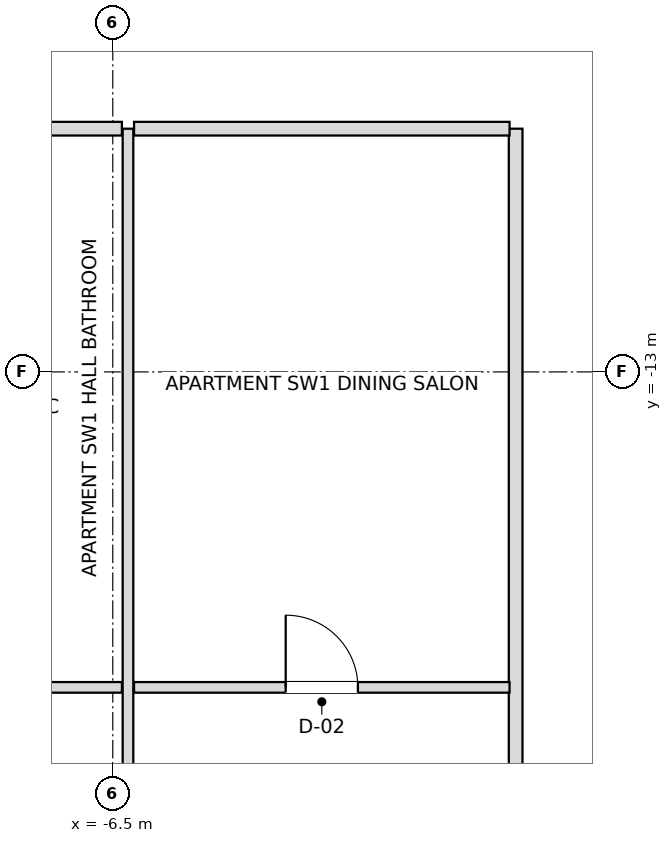
"""IFC4 building model, lengths in metres.
Left out: names, types, materials, properties, quantities, classifications, styles, units other than length and angle.
Written with IfcOpenShell. Run it as: python <this file> out.ifc"""

import sys

from ifc_helpers import new_model, si_unit, direction, frame, frame_2d, origin, place, context, subcontext, project, spatial, rectangle, extrude, element, fill, save


model = new_model("IFC4")
c1 = context("Model", 3, precision=1e-05, world=origin(), true_north=direction((0.0, 1.0)))
c2 = subcontext(c1, "Body", "Model", "MODEL_VIEW")
j1 = project(units=[si_unit("LENGTHUNIT", "METRE"), si_unit("PLANEANGLEUNIT", "RADIAN")], contexts=[c1])
p1 = place(None, origin())
s1 = spatial("IfcSite", under=j1, at=p1, CompositionType="ELEMENT")
p2 = place(p1, origin())
s2 = spatial("IfcBuilding", under=s1, at=p2, CompositionType="ELEMENT")
p3 = place(p2, frame((0.0, 0.0, 140.4)))
s3 = spatial("IfcBuildingStorey", under=s2, at=p3, CompositionType="ELEMENT", Elevation=140.4)
p4 = place(p3, frame((-6.3, -23.15, 0.0), z_axis=(0.0, 0.0, 1.0), x_axis=(0.0, 1.0, 0.0)))
e1 = element("IfcWall", 1, at=p4, inside=s3, PredefinedType="PARTITIONING", context=c2, shape_type="SweptSolid", body=[
    extrude(rectangle(XDim=13.35, YDim=0.14, at=frame_2d((6.675, 0.0))), origin(), (0.0, 0.0, 1.0), 2.816),
])
p5 = place(p4, frame((1.399, 0.0, 0.0)))
e2 = element("IfcOpeningElement", 2, at=p5, cuts=e1, PredefinedType="OPENING", context=c2, shape_type="SweptSolid", body=[
    extrude(rectangle(XDim=0.9, YDim=2.1, at=frame_2d((0.45, 1.05))), frame((0.0, 0.08, 0.0), z_axis=(0.0, -1.0, 0.0), x_axis=(1.0, 0.0, 0.0)), (0.0, 0.0, 1.0), 0.16),
])
p6 = place(p3, frame((-1.2, -23.15, 0.0), z_axis=(0.0, 0.0, 1.0), x_axis=(0.0, 1.0, 0.0)))
e3 = element("IfcWall", 3, at=p6, inside=s3, PredefinedType="PARTITIONING", context=c2, shape_type="SweptSolid", body=[
    extrude(rectangle(XDim=13.35, YDim=0.18, at=frame_2d((6.675, 0.0))), origin(), (0.0, 0.0, 1.0), 2.816),
])
p7 = place(p3, frame((-8.17, -17.15, 0.0), z_axis=(0.0, 0.0, 1.0), x_axis=(1.0, 0.0, 0.0)))
e4 = element("IfcWall", 4, at=p7, inside=s3, PredefinedType="PARTITIONING", context=c2, shape_type="SweptSolid", body=[
    extrude(rectangle(XDim=1.79, YDim=0.14, at=frame_2d((0.895, 0.0))), origin(), (0.0, 0.0, 1.0), 2.816),
])
p8 = place(p3, frame((-6.22, -17.15, 0.0), z_axis=(0.0, 0.0, 1.0), x_axis=(1.0, 0.0, 0.0)))
e5 = element("IfcWall", 5, at=p8, inside=s3, PredefinedType="PARTITIONING", context=c2, shape_type="SweptSolid", body=[
    extrude(rectangle(XDim=4.94, YDim=0.14, at=frame_2d((2.47, 0.0))), origin(), (0.0, 0.0, 1.0), 3.38),
])
p9 = place(p8, frame((1.995, 0.0, 0.0)))
e6 = element("IfcOpeningElement", 6, at=p9, cuts=e5, PredefinedType="OPENING", context=c2, shape_type="SweptSolid", body=[
    extrude(rectangle(XDim=0.95, YDim=2.1, at=frame_2d((0.475, 1.05))), frame((0.0, 0.08, 0.0), z_axis=(0.0, -1.0, 0.0), x_axis=(1.0, 0.0, 0.0)), (0.0, 0.0, 1.0), 0.16),
])
p10 = place(p3, frame((-8.17, -9.8, 0.0), z_axis=(0.0, 0.0, 1.0), x_axis=(1.0, 0.0, 0.0)))
e7 = element("IfcWall", 7, at=p10, inside=s3, PredefinedType="PARTITIONING", context=c2, shape_type="SweptSolid", body=[
    extrude(rectangle(XDim=1.79, YDim=0.18, at=frame_2d((0.895, 0.0))), origin(), (0.0, 0.0, 1.0), 2.816),
])
p11 = place(p3, frame((-6.22, -9.8, 0.0), z_axis=(0.0, 0.0, 1.0), x_axis=(1.0, 0.0, 0.0)))
e8 = element("IfcWall", 8, at=p11, inside=s3, PredefinedType="PARTITIONING", context=c2, shape_type="SweptSolid", body=[
    extrude(rectangle(XDim=4.94, YDim=0.18, at=frame_2d((2.47, 0.0))), origin(), (0.0, 0.0, 1.0), 3.38),
])
p12 = place(p9, origin())
e9 = element("IfcDoor", 9, at=p12, inside=s3, OperationType="SINGLE_SWING_LEFT", PredefinedType="DOOR", context=c2, shape_type="SweptSolid", body=[
    extrude(rectangle(XDim=0.95, YDim=2.1, at=frame_2d((0.475, 1.05))), frame((0.0, 0.025, 0.0), z_axis=(0.0, -1.0, 0.0), x_axis=(1.0, 0.0, 0.0)), (0.0, 0.0, 1.0), 0.05),
])
fill(e6, e9)
save(model, sys.argv[1])
